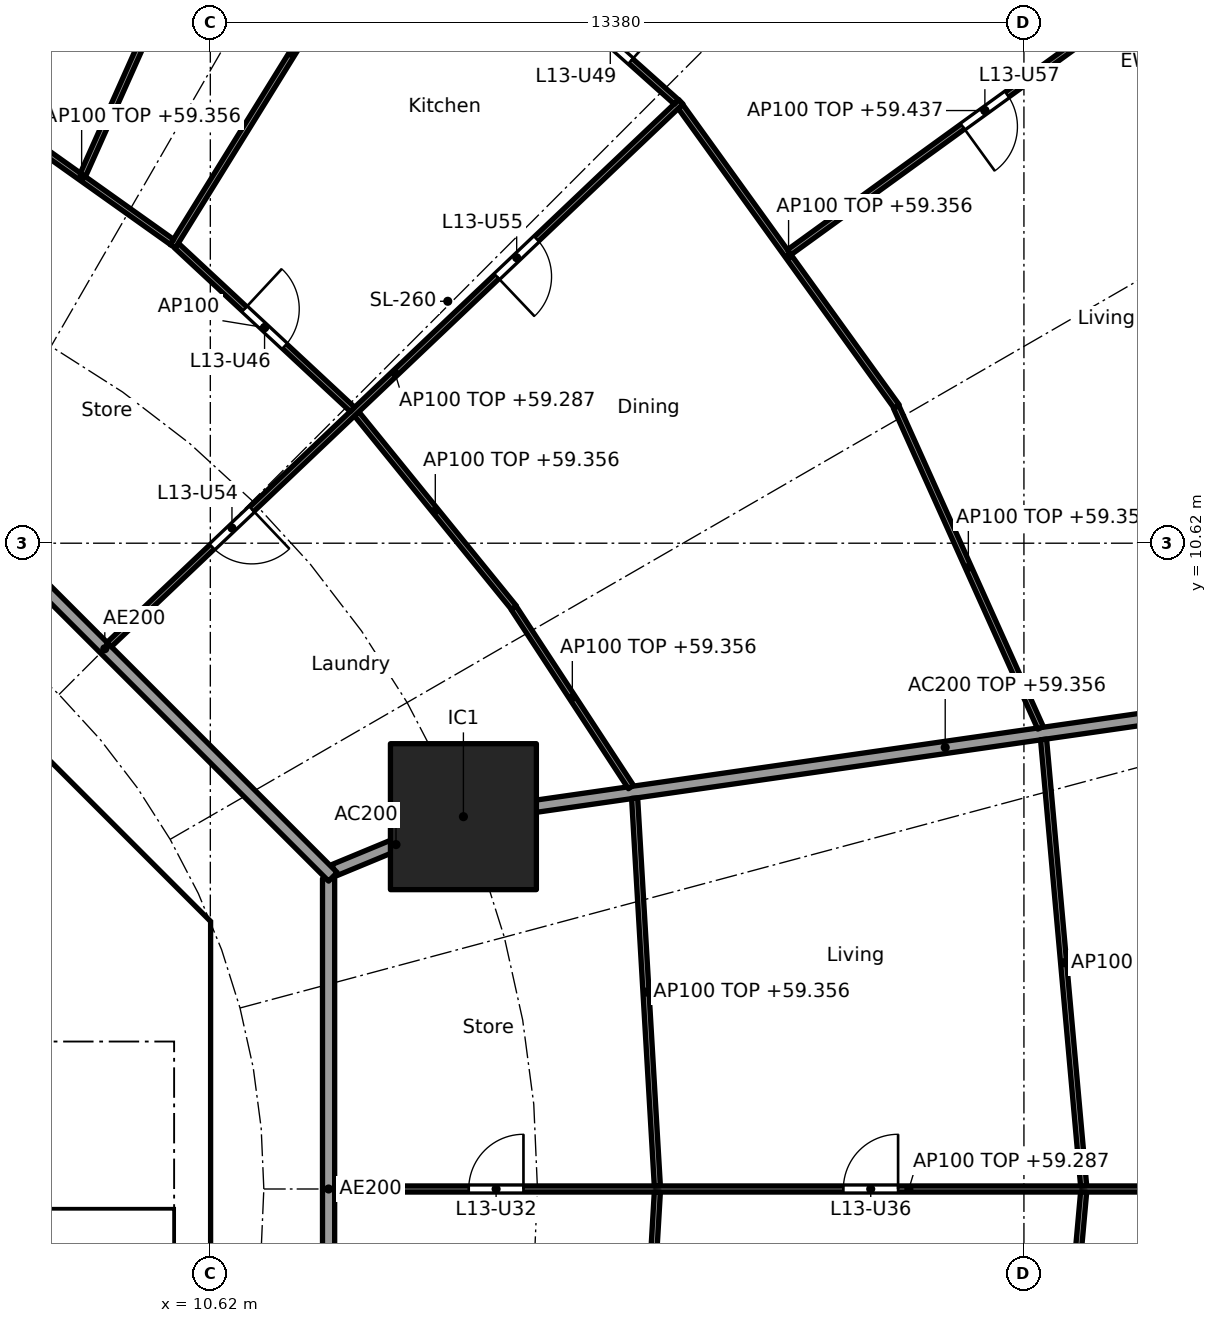
"""IFC4 building model, lengths in metres.
Left out: names, types, materials, properties, quantities, classifications, styles, units other than length and angle.
Written with IfcOpenShell. Run it as: python <this file> out.ifc"""

import sys

from ifc_helpers import new_model, si_unit, direction, frame, frame_2d, origin, origin_2d, place, context, subcontext, project, spatial, polyline, rectangle, outline, extrude, element, fill, save


model = new_model("IFC4")
c1 = context("Model", 3, precision=1e-05, world=origin(), true_north=direction((0.0, 1.0)))
c2 = subcontext(c1, "Body", "Model", "MODEL_VIEW")
j1 = project(units=[si_unit("LENGTHUNIT", "METRE"), si_unit("PLANEANGLEUNIT", "RADIAN")], contexts=[c1])
p1 = place(None, origin())
s1 = spatial("IfcSite", under=j1, at=p1, CompositionType="ELEMENT")
p2 = place(p1, origin())
s2 = spatial("IfcBuilding", under=s1, at=p2, CompositionType="ELEMENT")
p3 = place(p2, frame((0.0, 0.0, 56.6)))
s3 = spatial("IfcBuildingStorey", under=s2, at=p3, CompositionType="ELEMENT", Elevation=56.6)
p4 = place(p3, frame((14.782, 6.123, 0.0), z_axis=(0.0, 0.0, 1.0), x_axis=(1.0, 0.0, 0.0)))
e1 = element("IfcColumn", 1, at=p4, inside=s3, PredefinedType="COLUMN", context=c2, shape_type="SweptSolid", body=[
    extrude(rectangle(XDim=2.4, YDim=2.4, at=origin_2d()), origin(), (0.0, 0.0, 1.0), 3.7),
])
p5 = place(p3, frame((9.988, 4.613, 0.0), z_axis=(0.0, 0.0, 1.0), x_axis=(-0.707106781187, 0.707106781187, 0.0)))
e2 = element("IfcWall", 2, at=p5, inside=s3, PredefinedType="SHEAR", context=c2, shape_type="SweptSolid", body=[
    extrude(rectangle(XDim=7.602, YDim=0.6, at=frame_2d((3.801, 0.0))), origin(), (0.0, 0.0, 1.0), 3.44),
])
p6 = place(p5, frame((3.201, 0.0, 0.0)))
e3 = element("IfcOpeningElement", 3, at=p6, cuts=e2, PredefinedType="OPENING", context=c2, shape_type="SweptSolid", body=[
    extrude(rectangle(XDim=1.2, YDim=2.1, at=frame_2d((0.6, 1.05))), frame((0.0, 0.31, 0.0), z_axis=(0.0, -1.0, 0.0), x_axis=(1.0, 0.0, 0.0)), (0.0, 0.0, 1.0), 0.62),
])
p7 = place(p3, frame((6.7, 4.0, 0.0), z_axis=(0.0, 0.0, 1.0), x_axis=(1.0, 0.0, 0.0)))
e4 = element("IfcWall", 4, at=p7, inside=s3, PredefinedType="SOLIDWALL", context=c2, shape_type="SweptSolid", body=[
    extrude(rectangle(XDim=3.325, YDim=0.2, at=frame_2d((1.662, 0.0))), origin(), (0.0, 0.0, 1.0), 3.44),
])
p8 = place(p7, frame((1.25, 0.0, 0.0)))
e5 = element("IfcOpeningElement", 5, at=p8, cuts=e4, PredefinedType="OPENING", context=c2, shape_type="SweptSolid", body=[
    extrude(rectangle(XDim=1.1, YDim=2.1, at=frame_2d((0.55, 1.05))), frame((0.0, 0.11, 0.0), z_axis=(0.0, -1.0, 0.0), x_axis=(1.0, 0.0, 0.0)), (0.0, 0.0, 1.0), 0.22),
])
p9 = place(p3, origin())
e6 = element("IfcWall", 6, at=p9, inside=s3, PredefinedType="SHEAR", context=c2, shape_type="SweptSolid", body=[
    extrude(outline(polyline([(9.776, -4.401), (10.025, -4.152), (10.025, -3.801), (10.025, 4.152), (9.776, 4.401), (10.2, 4.825), (10.625, 4.401), (10.625, -4.401), (10.2, -4.825), (9.776, -4.401)])), origin(), (0.0, 0.0, 1.0), 3.44),
])
p10 = place(p3, frame((12.657, 5.243, 0.0), z_axis=(0.0, 0.0, 1.0), x_axis=(0.923853160736, 0.382747093259, 0.0)))
e7 = element("IfcWall", 7, at=p10, inside=s3, PredefinedType="PARTITIONING", context=c2, shape_type="SweptSolid", body=[
    extrude(rectangle(XDim=2.2, YDim=0.2, at=frame_2d((1.1, 0.0))), origin(), (0.0, 0.0, 1.0), 3.44),
])
p11 = place(p3, frame((14.832, 6.13, 0.0), z_axis=(0.0, 0.0, 1.0), x_axis=(0.989836541293, 0.142209779978, 0.0)))
e8 = element("IfcWall", 8, at=p11, inside=s3, PredefinedType="PARTITIONING", context=c2, shape_type="SweptSolid", body=[
    extrude(rectangle(XDim=15.909, YDim=0.2, at=frame_2d((7.955, 0.0))), origin(), (0.0, 0.0, 1.0), 2.756),
])
p12 = place(p3, frame((12.565, -5.104, 0.0), z_axis=(0.0, 0.0, 1.0), x_axis=(0.0, 1.0, 0.0)))
e9 = element("IfcWall", 9, at=p12, inside=s3, PredefinedType="PARTITIONING", context=c2, shape_type="SweptSolid", body=[
    extrude(rectangle(XDim=10.209, YDim=0.2, at=frame_2d((5.104, 0.0))), origin(), (0.0, 0.0, 1.0), 3.44),
])
p13 = place(p3, frame((12.635, 5.134, 0.0), z_axis=(0.0, 0.0, 1.0), x_axis=(-0.707106781187, 0.707106781187, 0.0)))
e10 = element("IfcWall", 10, at=p13, inside=s3, PredefinedType="PARTITIONING", context=c2, shape_type="SweptSolid", body=[
    extrude(rectangle(XDim=10.609, YDim=0.2, at=frame_2d((5.305, 0.0))), origin(), (0.0, 0.0, 1.0), 3.44),
])
p14 = place(p3, frame((12.665, 0.0, 0.0), z_axis=(0.0, 0.0, 1.0), x_axis=(1.0, 0.0, 0.0)))
e11 = element("IfcWall", 11, at=p14, inside=s3, PredefinedType="PARTITIONING", context=c2, shape_type="SweptSolid", body=[
    extrude(rectangle(XDim=18.885, YDim=0.1, at=frame_2d((9.443, 0.0))), origin(), (0.0, 0.0, 1.0), 2.687),
])
p15 = place(p14, frame((2.205, 0.0, 0.0)))
e12 = element("IfcOpeningElement", 12, at=p15, cuts=e11, PredefinedType="OPENING", context=c2, shape_type="SweptSolid", body=[
    extrude(rectangle(XDim=0.9, YDim=2.1, at=frame_2d((0.45, 1.05))), frame((0.0, 0.06, 0.0), z_axis=(0.0, -1.0, 0.0), x_axis=(1.0, 0.0, 0.0)), (0.0, 0.0, 1.0), 0.12),
])
p16 = place(p14, frame((8.366, 0.0, 0.0)))
e13 = element("IfcOpeningElement", 13, at=p16, cuts=e11, PredefinedType="OPENING", context=c2, shape_type="SweptSolid", body=[
    extrude(rectangle(XDim=0.9, YDim=2.1, at=frame_2d((0.45, 1.05))), frame((0.0, 0.06, 0.0), z_axis=(0.0, -1.0, 0.0), x_axis=(1.0, 0.0, 0.0)), (0.0, 0.0, 1.0), 0.12),
])
p17 = place(p14, frame((15.154, 0.0, 0.0)))
e14 = element("IfcOpeningElement", 14, at=p17, cuts=e11, PredefinedType="OPENING", context=c2, shape_type="SweptSolid", body=[
    extrude(rectangle(XDim=0.9, YDim=2.1, at=frame_2d((0.45, 1.05))), frame((0.0, 0.06, 0.0), z_axis=(0.0, -1.0, 0.0), x_axis=(1.0, 0.0, 0.0)), (0.0, 0.0, 1.0), 0.12),
])
p18 = place(p3, frame((17.971, 0.05, 0.0), z_axis=(0.0, 0.0, 1.0), x_axis=(-0.058513659907, 0.998286607946, 0.0)))
e15 = element("IfcWall", 15, at=p18, inside=s3, PredefinedType="PARTITIONING", context=c2, shape_type="SweptSolid", body=[
    extrude(rectangle(XDim=6.388, YDim=0.1, at=frame_2d((3.194, 0.0))), origin(), (0.0, 0.0, 1.0), 2.756),
])
p19 = place(p3, frame((17.971, -0.05, 0.0), z_axis=(0.0, 0.0, 1.0), x_axis=(-0.058476853647, -0.998288764631, 0.0)))
e16 = element("IfcWall", 16, at=p19, inside=s3, PredefinedType="PARTITIONING", context=c2, shape_type="SweptSolid", body=[
    extrude(rectangle(XDim=6.538, YDim=0.1, at=frame_2d((3.269, 0.0))), origin(), (0.0, 0.0, 1.0), 2.756),
])
p20 = place(p19, frame((2.794, 0.0, 0.0)))
e17 = element("IfcOpeningElement", 17, at=p20, cuts=e16, PredefinedType="OPENING", context=c2, shape_type="SweptSolid", body=[
    extrude(rectangle(XDim=0.9, YDim=2.1, at=frame_2d((0.45, 1.05))), frame((0.0, 0.06, 0.0), z_axis=(0.0, -1.0, 0.0), x_axis=(1.0, 0.0, 0.0)), (0.0, 0.0, 1.0), 0.12),
])
p21 = place(p3, frame((24.982, 0.05, 0.0), z_axis=(0.0, 0.0, 1.0), x_axis=(-0.08944290521, 0.995991951126, 0.0)))
e18 = element("IfcWall", 18, at=p21, inside=s3, PredefinedType="PARTITIONING", context=c2, shape_type="SweptSolid", body=[
    extrude(rectangle(XDim=7.373, YDim=0.1, at=frame_2d((3.686, 0.0))), origin(), (0.0, 0.0, 1.0), 2.756),
])
p22 = place(p3, frame((24.982, -0.05, 0.0), z_axis=(0.0, 0.0, 1.0), x_axis=(-0.089444214321, -0.995991833563, 0.0)))
e19 = element("IfcWall", 19, at=p22, inside=s3, PredefinedType="PARTITIONING", context=c2, shape_type="SweptSolid", body=[
    extrude(rectangle(XDim=7.523, YDim=0.1, at=frame_2d((3.761, 0.0))), origin(), (0.0, 0.0, 1.0), 2.756),
])
p23 = place(p22, frame((3.286, 0.0, 0.0)))
e20 = element("IfcOpeningElement", 20, at=p23, cuts=e19, PredefinedType="OPENING", context=c2, shape_type="SweptSolid", body=[
    extrude(rectangle(XDim=0.9, YDim=2.1, at=frame_2d((0.45, 1.05))), frame((0.0, 0.06, 0.0), z_axis=(0.0, -1.0, 0.0), x_axis=(1.0, 0.0, 0.0)), (0.0, 0.0, 1.0), 0.12),
])
p24 = place(p3, frame((17.537, 6.61, 0.0), z_axis=(0.0, 0.0, 1.0), x_axis=(-0.547637987196, 0.836715384692, 0.0)))
e21 = element("IfcWall", 21, at=p24, inside=s3, PredefinedType="PARTITIONING", context=c2, shape_type="SweptSolid", body=[
    extrude(rectangle(XDim=3.52, YDim=0.1, at=frame_2d((1.76, 0.0))), origin(), (0.0, 0.0, 1.0), 2.756),
])
p25 = place(p3, frame((24.273, 7.584, 0.0), z_axis=(0.0, 0.0, 1.0), x_axis=(-0.410201529109, 0.911994904326, 0.0)))
e22 = element("IfcWall", 22, at=p25, inside=s3, PredefinedType="PARTITIONING", context=c2, shape_type="SweptSolid", body=[
    extrude(rectangle(XDim=5.787, YDim=0.1, at=frame_2d((2.894, 0.0))), origin(), (0.0, 0.0, 1.0), 2.756),
])
p26 = place(p3, frame((15.614, 9.559, 0.0), z_axis=(0.0, 0.0, 1.0), x_axis=(-0.63012473344, 0.776493928056, 0.0)))
e23 = element("IfcWall", 23, at=p26, inside=s3, PredefinedType="PARTITIONING", context=c2, shape_type="SweptSolid", body=[
    extrude(rectangle(XDim=4.106, YDim=0.1, at=frame_2d((2.053, 0.0))), origin(), (0.0, 0.0, 1.0), 2.756),
])
p27 = place(p3, frame((21.908, 12.866, 0.0), z_axis=(0.0, 0.0, 1.0), x_axis=(-0.584558392935, 0.811351640936, 0.0)))
e24 = element("IfcWall", 24, at=p27, inside=s3, PredefinedType="PARTITIONING", context=c2, shape_type="SweptSolid", body=[
    extrude(rectangle(XDim=6.084, YDim=0.1, at=frame_2d((3.042, 0.0))), origin(), (0.0, 0.0, 1.0), 2.756),
])
p28 = place(p3, frame((20.141, 15.405, 0.0), z_axis=(0.0, 0.0, 1.0), x_axis=(0.809834895779, 0.58665785734, 0.0)))
e25 = element("IfcWall", 25, at=p28, inside=s3, PredefinedType="PARTITIONING", context=c2, shape_type="SweptSolid", body=[
    extrude(rectangle(XDim=7.945, YDim=0.1, at=frame_2d((3.973, 0.0))), origin(), (0.0, 0.0, 1.0), 2.837),
])
p29 = place(p28, frame((3.522, 0.0, 0.0)))
e26 = element("IfcOpeningElement", 26, at=p29, cuts=e25, PredefinedType="OPENING", context=c2, shape_type="SweptSolid", body=[
    extrude(rectangle(XDim=0.9, YDim=2.1, at=frame_2d((0.45, 1.05))), frame((0.0, 0.06, 0.0), z_axis=(0.0, -1.0, 0.0), x_axis=(1.0, 0.0, 0.0)), (0.0, 0.0, 1.0), 0.12),
])
p30 = place(p3, frame((8.957, 8.953, 0.0), z_axis=(0.0, 0.0, 1.0), x_axis=(0.725250022034, 0.688485588476, 0.0)))
e27 = element("IfcWall", 27, at=p30, inside=s3, PredefinedType="PARTITIONING", context=c2, shape_type="SweptSolid", body=[
    extrude(rectangle(XDim=12.963, YDim=0.1, at=frame_2d((6.481, 0.0))), origin(), (0.0, 0.0, 1.0), 2.687),
])
p31 = place(p30, frame((2.333, 0.0, 0.0)))
e28 = element("IfcOpeningElement", 28, at=p31, cuts=e27, PredefinedType="OPENING", context=c2, shape_type="SweptSolid", body=[
    extrude(rectangle(XDim=0.9, YDim=2.1, at=frame_2d((0.45, 1.05))), frame((0.0, 0.06, 0.0), z_axis=(0.0, -1.0, 0.0), x_axis=(1.0, 0.0, 0.0)), (0.0, 0.0, 1.0), 0.12),
])
p32 = place(p30, frame((8.79, 0.0, 0.0)))
e29 = element("IfcOpeningElement", 29, at=p32, cuts=e27, PredefinedType="OPENING", context=c2, shape_type="SweptSolid", body=[
    extrude(rectangle(XDim=0.9, YDim=2.1, at=frame_2d((0.45, 1.05))), frame((0.0, 0.06, 0.0), z_axis=(0.0, -1.0, 0.0), x_axis=(1.0, 0.0, 0.0)), (0.0, 0.0, 1.0), 0.12),
])
p33 = place(p3, frame((12.958, 12.82, 0.0), z_axis=(0.0, 0.0, 1.0), x_axis=(-0.732022571638, 0.681280378855, 0.0)))
e30 = element("IfcWall", 30, at=p33, inside=s3, PredefinedType="PARTITIONING", context=c2, shape_type="SweptSolid", body=[
    extrude(rectangle(XDim=3.95, YDim=0.1, at=frame_2d((1.975, 0.0))), origin(), (0.0, 0.0, 1.0), 3.44),
])
p34 = place(p33, frame((1.525, 0.0, 0.0)))
e31 = element("IfcOpeningElement", 31, at=p34, cuts=e30, PredefinedType="OPENING", context=c2, shape_type="SweptSolid", body=[
    extrude(rectangle(XDim=0.9, YDim=2.1, at=frame_2d((0.45, 1.05))), frame((0.0, 0.06, 0.0), z_axis=(0.0, -1.0, 0.0), x_axis=(1.0, 0.0, 0.0)), (0.0, 0.0, 1.0), 0.12),
])
p35 = place(p3, frame((18.285, 17.877, 0.0), z_axis=(0.0, 0.0, 1.0), x_axis=(-0.745806142791, 0.666163041136, 0.0)))
e32 = element("IfcWall", 32, at=p35, inside=s3, PredefinedType="PARTITIONING", context=c2, shape_type="SweptSolid", body=[
    extrude(rectangle(XDim=5.831, YDim=0.1, at=frame_2d((2.915, 0.0))), origin(), (0.0, 0.0, 1.0), 2.756),
])
p36 = place(p35, frame((1.008, 0.0, 0.0)))
e33 = element("IfcOpeningElement", 33, at=p36, cuts=e32, PredefinedType="OPENING", context=c2, shape_type="SweptSolid", body=[
    extrude(rectangle(XDim=0.9, YDim=2.1, at=frame_2d((0.45, 1.05))), frame((0.0, 0.06, 0.0), z_axis=(0.0, -1.0, 0.0), x_axis=(1.0, 0.0, 0.0)), (0.0, 0.0, 1.0), 0.12),
])
p37 = place(p3, frame((10.003, 15.503, 0.0), z_axis=(0.0, 0.0, 1.0), x_axis=(0.52645953022, 0.850200189979, 0.0)))
e34 = element("IfcWall", 34, at=p37, inside=s3, PredefinedType="PARTITIONING", context=c2, shape_type="SweptSolid", body=[
    extrude(rectangle(XDim=7.45, YDim=0.1, at=frame_2d((3.725, 0.0))), origin(), (0.0, 0.0, 1.0), 2.756),
])
p38 = place(p3, frame((9.989, 15.574, 0.0), z_axis=(0.0, 0.0, 1.0), x_axis=(-0.81494477814, 0.57953861699, 0.0)))
e35 = element("IfcWall", 35, at=p38, inside=s3, PredefinedType="PARTITIONING", context=c2, shape_type="SweptSolid", body=[
    extrude(rectangle(XDim=3.644, YDim=0.1, at=frame_2d((1.822, 0.0))), origin(), (0.0, 0.0, 1.0), 2.756),
])
p39 = place(p3, frame((8.524, 16.676, 0.0), z_axis=(0.0, 0.0, 1.0), x_axis=(0.408065177262, 0.912952797852, 0.0)))
e36 = element("IfcWall", 36, at=p39, inside=s3, PredefinedType="PARTITIONING", context=c2, shape_type="SweptSolid", body=[
    extrude(rectangle(XDim=15.089, YDim=0.1, at=frame_2d((7.544, 0.0))), origin(), (0.0, 0.0, 1.0), 2.837),
])
p40 = place(p3, frame((6.137, 14.83, 0.0), z_axis=(0.0, 0.0, 1.0), x_axis=(0.279843546189, 0.960045618529, 0.0)))
e37 = element("IfcWall", 37, at=p40, inside=s3, PredefinedType="PARTITIONING", context=c2, shape_type="SweptSolid", body=[
    extrude(rectangle(XDim=10.127, YDim=0.1, at=frame_2d((5.063, 0.0))), origin(), (0.0, 0.0, 1.0), 3.44),
])
p41 = place(p40, frame((1.334, 0.0, 0.0)))
e38 = element("IfcOpeningElement", 38, at=p41, cuts=e37, PredefinedType="OPENING", context=c2, shape_type="SweptSolid", body=[
    extrude(rectangle(XDim=0.9, YDim=2.1, at=frame_2d((0.45, 1.05))), frame((0.0, 0.06, 0.0), z_axis=(0.0, -1.0, 0.0), x_axis=(1.0, 0.0, 0.0)), (0.0, 0.0, 1.0), 0.12),
])
p42 = place(p40, frame((6.091, 0.0, 0.0)))
e39 = element("IfcOpeningElement", 39, at=p42, cuts=e37, PredefinedType="OPENING", context=c2, shape_type="SweptSolid", body=[
    extrude(rectangle(XDim=0.9, YDim=2.1, at=frame_2d((0.45, 1.05))), frame((0.0, 0.06, 0.0), z_axis=(0.0, -1.0, 0.0), x_axis=(1.0, 0.0, 0.0)), (0.0, 0.0, 1.0), 0.12),
])
p43 = place(p8, frame((1.1, 0.0, 0.0), x_axis=(-1.0, 0.0, 0.0)))
e40 = element("IfcDoor", 40, at=p43, inside=s3, OperationType="SINGLE_SWING_RIGHT", PredefinedType="DOOR", context=c2, shape_type="SweptSolid", body=[
    extrude(rectangle(XDim=1.1, YDim=2.1, at=frame_2d((0.55, 1.05))), frame((0.0, 0.025, 0.0), z_axis=(0.0, -1.0, 0.0), x_axis=(1.0, 0.0, 0.0)), (0.0, 0.0, 1.0), 0.05),
])
fill(e5, e40)
p44 = place(p15, origin())
e41 = element("IfcDoor", 41, at=p44, inside=s3, OperationType="SINGLE_SWING_RIGHT", PredefinedType="DOOR", context=c2, shape_type="SweptSolid", body=[
    extrude(rectangle(XDim=0.9, YDim=2.1, at=frame_2d((0.45, 1.05))), frame((0.0, 0.025, 0.0), z_axis=(0.0, -1.0, 0.0), x_axis=(1.0, 0.0, 0.0)), (0.0, 0.0, 1.0), 0.05),
])
fill(e12, e41)
p45 = place(p16, origin())
e42 = element("IfcDoor", 42, at=p45, inside=s3, OperationType="SINGLE_SWING_RIGHT", PredefinedType="DOOR", context=c2, shape_type="SweptSolid", body=[
    extrude(rectangle(XDim=0.9, YDim=2.1, at=frame_2d((0.45, 1.05))), frame((0.0, 0.025, 0.0), z_axis=(0.0, -1.0, 0.0), x_axis=(1.0, 0.0, 0.0)), (0.0, 0.0, 1.0), 0.05),
])
fill(e13, e42)
p46 = place(p34, frame((0.9, 0.0, 0.0), x_axis=(-1.0, 0.0, 0.0)))
e43 = element("IfcDoor", 43, at=p46, inside=s3, OperationType="SINGLE_SWING_LEFT", PredefinedType="DOOR", context=c2, shape_type="SweptSolid", body=[
    extrude(rectangle(XDim=0.9, YDim=2.1, at=frame_2d((0.45, 1.05))), frame((0.0, 0.025, 0.0), z_axis=(0.0, -1.0, 0.0), x_axis=(1.0, 0.0, 0.0)), (0.0, 0.0, 1.0), 0.05),
])
fill(e31, e43)
p47 = place(p36, frame((0.9, 0.0, 0.0), x_axis=(-1.0, 0.0, 0.0)))
e44 = element("IfcDoor", 44, at=p47, inside=s3, OperationType="SINGLE_SWING_RIGHT", PredefinedType="DOOR", context=c2, shape_type="SweptSolid", body=[
    extrude(rectangle(XDim=0.9, YDim=2.1, at=frame_2d((0.45, 1.05))), frame((0.0, 0.025, 0.0), z_axis=(0.0, -1.0, 0.0), x_axis=(1.0, 0.0, 0.0)), (0.0, 0.0, 1.0), 0.05),
])
fill(e33, e44)
p48 = place(p31, frame((0.9, 0.0, 0.0), x_axis=(-1.0, 0.0, 0.0)))
e45 = element("IfcDoor", 45, at=p48, inside=s3, OperationType="SINGLE_SWING_LEFT", PredefinedType="DOOR", context=c2, shape_type="SweptSolid", body=[
    extrude(rectangle(XDim=0.9, YDim=2.1, at=frame_2d((0.45, 1.05))), frame((0.0, 0.025, 0.0), z_axis=(0.0, -1.0, 0.0), x_axis=(1.0, 0.0, 0.0)), (0.0, 0.0, 1.0), 0.05),
])
fill(e28, e45)
p49 = place(p32, frame((0.9, 0.0, 0.0), x_axis=(-1.0, 0.0, 0.0)))
e46 = element("IfcDoor", 46, at=p49, inside=s3, OperationType="SINGLE_SWING_RIGHT", PredefinedType="DOOR", context=c2, shape_type="SweptSolid", body=[
    extrude(rectangle(XDim=0.9, YDim=2.1, at=frame_2d((0.45, 1.05))), frame((0.0, 0.025, 0.0), z_axis=(0.0, -1.0, 0.0), x_axis=(1.0, 0.0, 0.0)), (0.0, 0.0, 1.0), 0.05),
])
fill(e29, e46)
p50 = place(p29, frame((0.9, 0.0, 0.0), x_axis=(-1.0, 0.0, 0.0)))
e47 = element("IfcDoor", 47, at=p50, inside=s3, OperationType="SINGLE_SWING_RIGHT", PredefinedType="DOOR", context=c2, shape_type="SweptSolid", body=[
    extrude(rectangle(XDim=0.9, YDim=2.1, at=frame_2d((0.45, 1.05))), frame((0.0, 0.025, 0.0), z_axis=(0.0, -1.0, 0.0), x_axis=(1.0, 0.0, 0.0)), (0.0, 0.0, 1.0), 0.05),
])
fill(e26, e47)
save(model, sys.argv[1])
